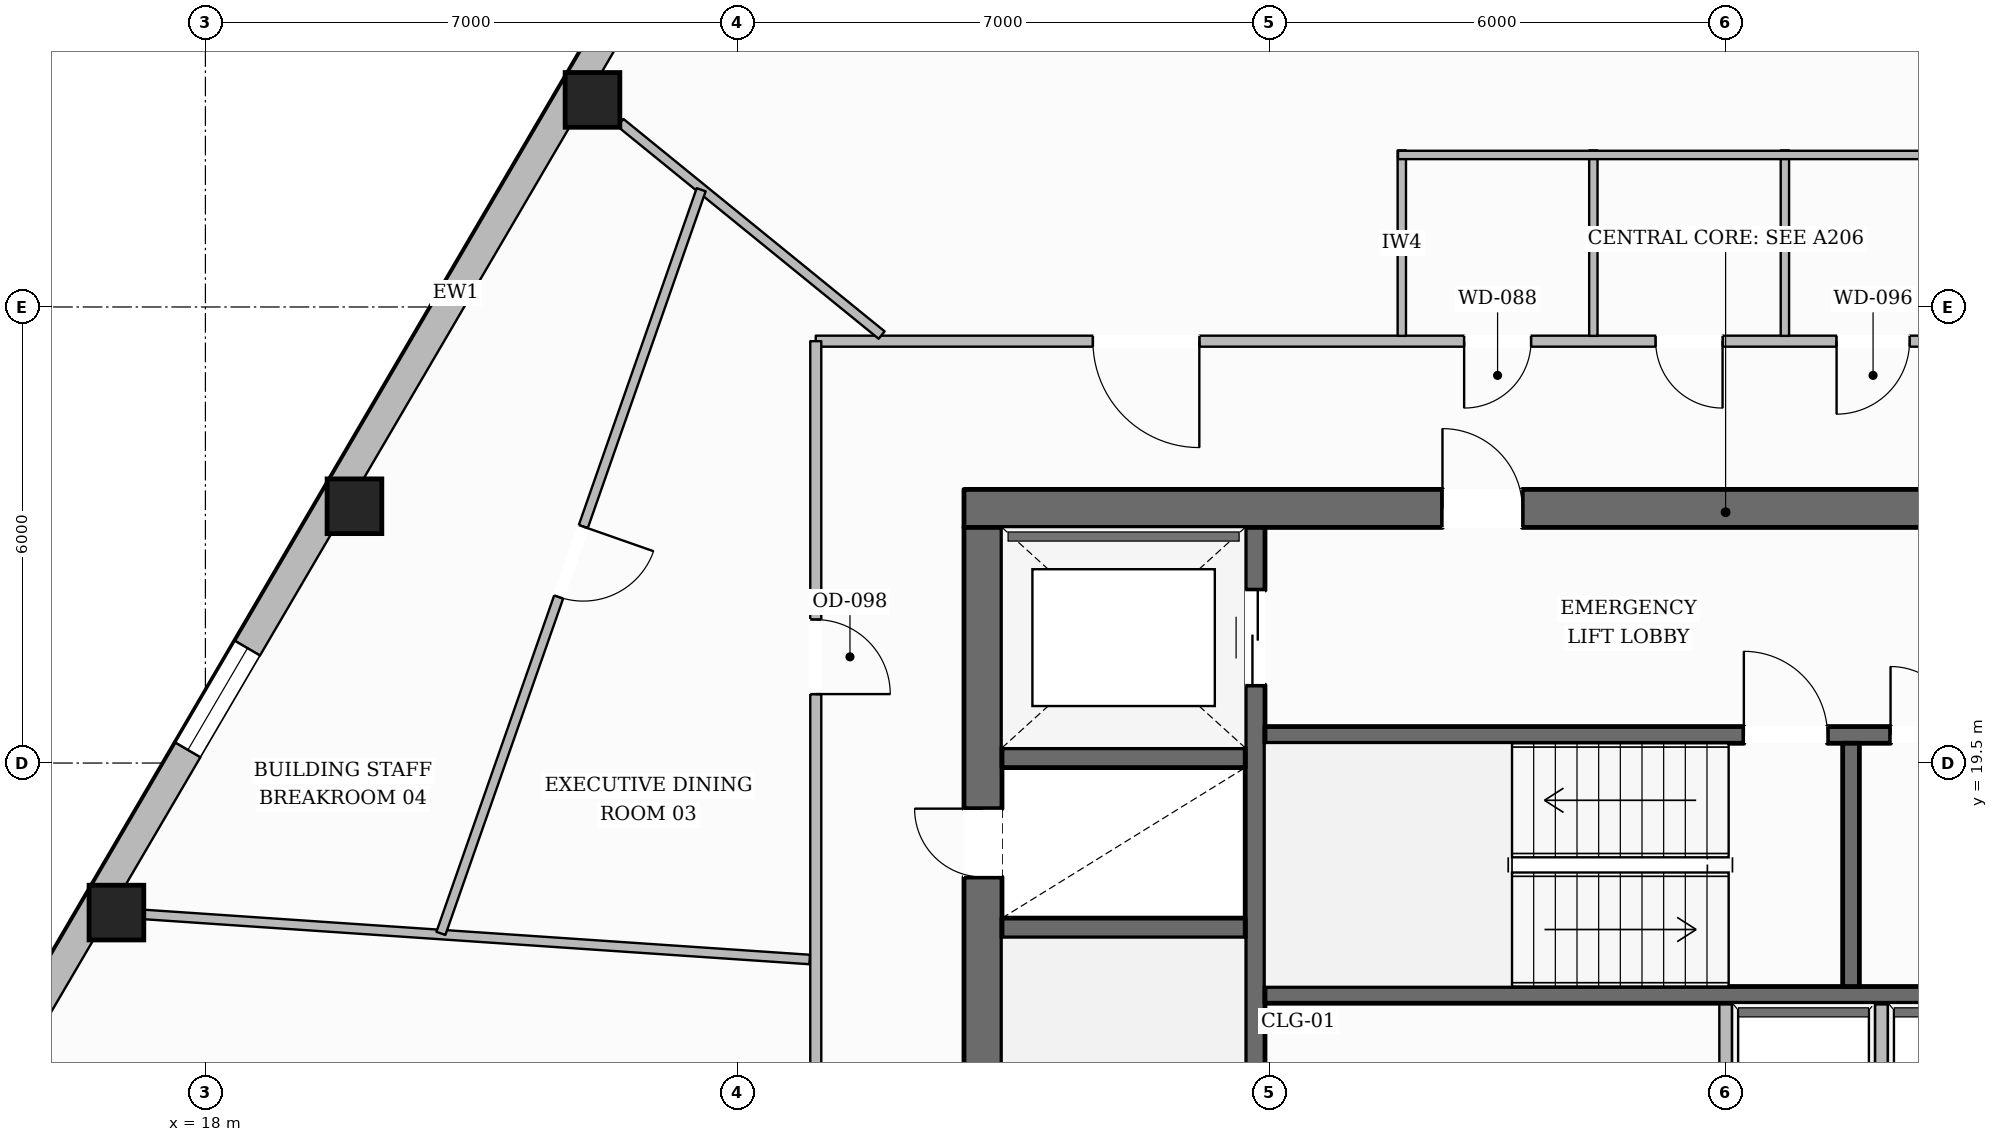
"""IFC4 building model, lengths in metres.
Left out: names, types, materials, properties, quantities, classifications, styles, units other than length and angle.
Written with IfcOpenShell. Run it as: python <this file> out.ifc"""

import sys

from ifc_helpers import new_model, si_unit, direction, frame, frame_2d, origin, origin_2d, place, context, subcontext, project, spatial, rectangle, hollow_rectangle, extrude, element, fill, save


model = new_model("IFC4")
c1 = context("Model", 3, precision=1e-05, world=origin(), true_north=direction((0.0, 1.0)))
c2 = subcontext(c1, "Body", "Model", "MODEL_VIEW")
j1 = project(units=[si_unit("LENGTHUNIT", "METRE"), si_unit("PLANEANGLEUNIT", "RADIAN")], contexts=[c1])
p1 = place(None, origin())
s1 = spatial("IfcSite", under=j1, at=p1, CompositionType="ELEMENT")
p2 = place(p1, origin())
s2 = spatial("IfcBuilding", under=s1, at=p2, CompositionType="ELEMENT")
p3 = place(p2, frame((0.0, 0.0, 143.25)))
s3 = spatial("IfcBuildingStorey", under=s2, at=p3, CompositionType="ELEMENT", Elevation=143.25)
p4 = place(p3, frame((27.98, 22.85, 0.0), z_axis=(0.0, 0.0, 1.0), x_axis=(1.0, 0.0, 0.0)))
e1 = element("IfcWall", 1, at=p4, inside=s3, PredefinedType="SOLIDWALL", context=c2, shape_type="SweptSolid", body=[
    extrude(rectangle(XDim=20.04, YDim=0.5, at=frame_2d((10.02, 0.0))), origin(), (0.0, 0.0, 1.0), 3.6),
])
p5 = place(p4, frame((6.295, 0.0, 0.0)))
e2 = element("IfcOpeningElement", 2, at=p5, cuts=e1, PredefinedType="OPENING", context=c2, shape_type="SweptSolid", body=[
    extrude(rectangle(XDim=1.05, YDim=2.15, at=frame_2d((0.525, 1.075))), frame((0.0, 0.26, 0.0), z_axis=(0.0, -1.0, 0.0), x_axis=(1.0, 0.0, 0.0)), (0.0, 0.0, 1.0), 0.52),
])
p6 = place(p4, frame((12.695, 0.0, 0.0)))
e3 = element("IfcOpeningElement", 3, at=p6, cuts=e1, PredefinedType="OPENING", context=c2, shape_type="SweptSolid", body=[
    extrude(rectangle(XDim=1.05, YDim=2.15, at=frame_2d((0.525, 1.075))), frame((0.0, 0.26, 0.0), z_axis=(0.0, -1.0, 0.0), x_axis=(1.0, 0.0, 0.0)), (0.0, 0.0, 1.0), 0.52),
])
p7 = place(p3, frame((28.23, 9.6, 0.0), z_axis=(0.0, 0.0, 1.0), x_axis=(0.0, 1.0, 0.0)))
e4 = element("IfcWall", 4, at=p7, inside=s3, PredefinedType="SOLIDWALL", context=c2, shape_type="SweptSolid", body=[
    extrude(rectangle(XDim=13.0, YDim=0.5, at=frame_2d((6.5, 0.0))), origin(), (0.0, 0.0, 1.0), 3.6),
])
p8 = place(p7, frame((0.2, 0.0, 0.0)))
e5 = element("IfcOpeningElement", 5, at=p8, cuts=e4, PredefinedType="OPENING", context=c2, shape_type="SweptSolid", body=[
    extrude(rectangle(XDim=1.1, YDim=2.15, at=frame_2d((0.55, 1.075))), frame((0.0, 0.26, 0.0), z_axis=(0.0, -1.0, 0.0), x_axis=(1.0, 0.0, 0.0)), (0.0, 0.0, 1.0), 0.52),
])
p9 = place(p7, frame((8.4, 0.0, 0.0)))
e6 = element("IfcOpeningElement", 6, at=p9, cuts=e4, PredefinedType="OPENING", context=c2, shape_type="SweptSolid", body=[
    extrude(rectangle(XDim=0.9, YDim=2.1, at=frame_2d((0.45, 1.05))), frame((0.0, 0.26, 0.0), z_axis=(0.0, -1.0, 0.0), x_axis=(1.0, 0.0, 0.0)), (0.0, 0.0, 1.0), 0.52),
])
p10 = place(p3, frame((31.81, 9.6, 0.0), z_axis=(0.0, 0.0, 1.0), x_axis=(0.0, 1.0, 0.0)))
e7 = element("IfcWall", 7, at=p10, inside=s3, PredefinedType="SHEAR", context=c2, shape_type="SweptSolid", body=[
    extrude(rectangle(XDim=13.0, YDim=0.26, at=frame_2d((6.5, 0.0))), origin(), (0.0, 0.0, 1.0), 3.6),
])
p11 = place(p10, frame((10.925, 0.0, 0.0)))
e8 = element("IfcOpeningElement", 8, at=p11, cuts=e7, PredefinedType="OPENING", context=c2, shape_type="SweptSolid", body=[
    extrude(rectangle(XDim=1.25, YDim=2.25, at=frame_2d((0.625, 1.125))), frame((0.0, 0.14, 0.0), z_axis=(0.0, -1.0, 0.0), x_axis=(1.0, 0.0, 0.0)), (0.0, 0.0, 1.0), 0.28),
])
for number, where, z_axis, x_axis in (
    (9, (28.48, 17.33, 0.0), (0.0, 0.0, 1.0), (1.0, 0.0, 0.0)),
    (10, (28.48, 19.57, 0.0), (0.0, 0.0, 1.0), (1.0, 0.0, 0.0)),
):
    element("IfcWall", number, at=place(p3, frame(where, z_axis=z_axis, x_axis=x_axis)), inside=s3, PredefinedType="SHEAR", context=c2, shape_type="SweptSolid", body=[
        extrude(rectangle(XDim=3.2, YDim=0.26, at=frame_2d((1.6, 0.0))), origin(), (0.0, 0.0, 1.0), 3.6),
    ])
p12 = place(p3, frame((31.94, 19.87, 0.0), z_axis=(0.0, 0.0, 1.0), x_axis=(1.0, 0.0, 0.0)))
e11 = element("IfcWall", 11, at=p12, inside=s3, PredefinedType="SOLIDWALL", context=c2, shape_type="SweptSolid", body=[
    extrude(rectangle(XDim=12.12, YDim=0.22, at=frame_2d((6.06, 0.0))), origin(), (0.0, 0.0, 1.0), 3.6),
])
p13 = place(p12, frame((6.3, 0.0, 0.0)))
e12 = element("IfcOpeningElement", 12, at=p13, cuts=e11, PredefinedType="OPENING", context=c2, shape_type="SweptSolid", body=[
    extrude(rectangle(XDim=1.1, YDim=2.15, at=frame_2d((0.55, 1.075))), frame((0.0, 0.12, 0.0), z_axis=(0.0, -1.0, 0.0), x_axis=(1.0, 0.0, 0.0)), (0.0, 0.0, 1.0), 0.24),
])
p14 = place(p12, frame((8.23, 0.0, 0.0)))
e13 = element("IfcOpeningElement", 13, at=p14, cuts=e11, PredefinedType="OPENING", context=c2, shape_type="SweptSolid", body=[
    extrude(rectangle(XDim=0.9, YDim=2.1, at=frame_2d((0.45, 1.05))), frame((0.0, 0.12, 0.0), z_axis=(0.0, -1.0, 0.0), x_axis=(1.0, 0.0, 0.0)), (0.0, 0.0, 1.0), 0.24),
])
p15 = place(p12, frame((10.45, 0.0, 0.0)))
e14 = element("IfcOpeningElement", 14, at=p15, cuts=e11, PredefinedType="OPENING", context=c2, shape_type="SweptSolid", body=[
    extrude(rectangle(XDim=0.9, YDim=2.1, at=frame_2d((0.45, 1.05))), frame((0.0, 0.12, 0.0), z_axis=(0.0, -1.0, 0.0), x_axis=(1.0, 0.0, 0.0)), (0.0, 0.0, 1.0), 0.24),
])
p16 = place(p3, frame((31.94, 16.45, 0.0), z_axis=(0.0, 0.0, 1.0), x_axis=(1.0, 0.0, 0.0)))
e15 = element("IfcWall", 15, at=p16, inside=s3, PredefinedType="SOLIDWALL", context=c2, shape_type="SweptSolid", body=[
    extrude(rectangle(XDim=12.12, YDim=0.22, at=frame_2d((6.06, 0.0))), origin(), (0.0, 0.0, 1.0), 3.6),
])
p17 = place(p3, frame((39.65, 16.56, 0.0), z_axis=(0.0, 0.0, 1.0), x_axis=(0.0, 1.0, 0.0)))
e16 = element("IfcWall", 16, at=p17, inside=s3, PredefinedType="SOLIDWALL", context=c2, shape_type="SweptSolid", body=[
    extrude(rectangle(XDim=3.2, YDim=0.22, at=frame_2d((1.6, 0.0))), origin(), (0.0, 0.0, 1.0), 3.6),
])
for number, where, z_axis, x_axis in (
    (17, (23.093, 28.224, 0.0), (0.0, 0.0, 1.0), (1.0, 0.0, 0.0)),
    (18, (19.961, 22.878, 0.0), (0.0, 0.0, 1.0), (1.0, 0.0, 0.0)),
    (19, (16.829, 17.533, 0.0), (0.0, 0.0, 1.0), (1.0, 0.0, 0.0)),
):
    element("IfcColumn", number, at=place(p3, frame(where, z_axis=z_axis, x_axis=x_axis)), inside=s3, PredefinedType="COLUMN", context=c2, shape_type="SweptSolid", body=[
        extrude(hollow_rectangle(XDim=0.72, YDim=0.72, WallThickness=0.032, at=origin_2d()), origin(), (0.0, 0.0, 1.0), 3.6),
    ])
p18 = place(p3, frame((13.223, 11.91, 0.0), z_axis=(0.0, 0.0, 1.0), x_axis=(0.505453242286, 0.86285399684, 0.0)))
e20 = element("IfcWall", 20, at=p18, inside=s3, PredefinedType="STANDARD", context=c2, shape_type="SweptSolid", body=[
    extrude(rectangle(XDim=38.125, YDim=0.38, at=frame_2d((19.062, 0.0))), origin(), (0.0, 0.0, 1.0), 3.059),
])
p19 = place(p18, frame((27.994, 0.0, 0.0)))
e21 = element("IfcOpeningElement", 21, at=p19, cuts=e20, PredefinedType="OPENING", context=c2, shape_type="SweptSolid", body=[
    extrude(rectangle(XDim=1.0, YDim=2.2, at=frame_2d((0.5, 1.1))), frame((0.0, 0.2, 0.0), z_axis=(0.0, -1.0, 0.0), x_axis=(1.0, 0.0, 0.0)), (0.0, 0.0, 1.0), 0.4),
])
p20 = place(p18, frame((33.78, 0.0, 0.65)))
e22 = element("IfcOpeningElement", 22, at=p20, cuts=e20, PredefinedType="OPENING", context=c2, shape_type="SweptSolid", body=[
    extrude(rectangle(XDim=1.55, YDim=1.75, at=frame_2d((0.775, 0.875))), frame((0.0, 0.2, 0.0), z_axis=(0.0, -1.0, 0.0), x_axis=(1.0, 0.0, 0.0)), (0.0, 0.0, 1.0), 0.4),
])
p21 = place(p18, frame((21.388, 0.0, 0.65)))
e23 = element("IfcOpeningElement", 23, at=p21, cuts=e20, PredefinedType="OPENING", context=c2, shape_type="SweptSolid", body=[
    extrude(rectangle(XDim=1.55, YDim=1.75, at=frame_2d((0.775, 0.875))), frame((0.0, 0.2, 0.0), z_axis=(0.0, -1.0, 0.0), x_axis=(1.0, 0.0, 0.0)), (0.0, 0.0, 1.0), 0.4),
])
p22 = place(p18, frame((8.997, 0.0, 0.65)))
e24 = element("IfcOpeningElement", 24, at=p22, cuts=e20, PredefinedType="OPENING", context=c2, shape_type="SweptSolid", body=[
    extrude(rectangle(XDim=1.55, YDim=1.75, at=frame_2d((0.775, 0.875))), frame((0.0, 0.2, 0.0), z_axis=(0.0, -1.0, 0.0), x_axis=(1.0, 0.0, 0.0)), (0.0, 0.0, 1.0), 0.4),
])
p23 = place(p18, frame((2.802, 0.0, 0.65)))
e25 = element("IfcOpeningElement", 25, at=p23, cuts=e20, PredefinedType="OPENING", context=c2, shape_type="SweptSolid", body=[
    extrude(rectangle(XDim=1.55, YDim=1.75, at=frame_2d((0.775, 0.875))), frame((0.0, 0.2, 0.0), z_axis=(0.0, -1.0, 0.0), x_axis=(1.0, 0.0, 0.0)), (0.0, 0.0, 1.0), 0.4),
])
for number, where, z_axis, x_axis in (
    (26, (38.0, 14.1, 0.0), (0.0, 0.0, 1.0), (0.0, 1.0, 0.0)),
    (27, (40.05, 14.1, 0.0), (0.0, 0.0, 1.0), (0.0, 1.0, 0.0)),
):
    element("IfcWall", number, at=place(p3, frame(where, z_axis=z_axis, x_axis=x_axis)), inside=s3, PredefinedType="PARTITIONING", context=c2, shape_type="SweptSolid", body=[
        extrude(rectangle(XDim=2.24, YDim=0.165, at=frame_2d((1.12, 0.0))), origin(), (0.0, 0.0, 1.0), 3.6),
    ])
p24 = place(p3, frame((49.97, 25.05, 0.0), z_axis=(0.0, 0.0, 1.0), x_axis=(-1.0, 0.0, 0.0)))
e28 = element("IfcWall", 28, at=p24, inside=s3, PredefinedType="PARTITIONING", context=c2, shape_type="SweptSolid", body=[
    extrude(rectangle(XDim=23.94, YDim=0.145, at=frame_2d((11.97, 0.0))), origin(), (0.0, 0.0, 1.0), 3.6),
])
p25 = place(p24, frame((14.53, 0.0, 0.0)))
e29 = element("IfcOpeningElement", 29, at=p25, cuts=e28, PredefinedType="OPENING", context=c2, shape_type="SweptSolid", body=[
    extrude(rectangle(XDim=0.88, YDim=2.1, at=frame_2d((0.44, 1.05))), frame((0.0, 0.083, 0.0), z_axis=(0.0, -1.0, 0.0), x_axis=(1.0, 0.0, 0.0)), (0.0, 0.0, 1.0), 0.165),
])
p26 = place(p24, frame((12.01, 0.0, 0.0)))
e30 = element("IfcOpeningElement", 30, at=p26, cuts=e28, PredefinedType="OPENING", context=c2, shape_type="SweptSolid", body=[
    extrude(rectangle(XDim=0.88, YDim=2.1, at=frame_2d((0.44, 1.05))), frame((0.0, 0.083, 0.0), z_axis=(0.0, -1.0, 0.0), x_axis=(1.0, 0.0, 0.0)), (0.0, 0.0, 1.0), 0.165),
])
p27 = place(p24, frame((9.55, 0.0, 0.0)))
e31 = element("IfcOpeningElement", 31, at=p27, cuts=e28, PredefinedType="OPENING", context=c2, shape_type="SweptSolid", body=[
    extrude(rectangle(XDim=0.96, YDim=2.1, at=frame_2d((0.48, 1.05))), frame((0.0, 0.083, 0.0), z_axis=(0.0, -1.0, 0.0), x_axis=(1.0, 0.0, 0.0)), (0.0, 0.0, 1.0), 0.165),
])
p28 = place(p24, frame((18.894, 0.0, 0.0)))
e32 = element("IfcOpeningElement", 32, at=p28, cuts=e28, PredefinedType="OPENING", context=c2, shape_type="SweptSolid", body=[
    extrude(rectangle(XDim=1.4, YDim=2.2, at=frame_2d((0.7, 1.1))), frame((0.0, 0.083, 0.0), z_axis=(0.0, -1.0, 0.0), x_axis=(1.0, 0.0, 0.0)), (0.0, 0.0, 1.0), 0.165),
])
p29 = place(p3, frame((26.03, 25.05, 0.0), z_axis=(0.0, 0.0, 1.0), x_axis=(0.0, -1.0, 0.0)))
e33 = element("IfcWall", 33, at=p29, inside=s3, PredefinedType="PARTITIONING", context=c2, shape_type="SweptSolid", body=[
    extrude(rectangle(XDim=17.9, YDim=0.145, at=frame_2d((8.95, 0.0))), origin(), (0.0, 0.0, 1.0), 3.288),
])
p30 = place(p29, frame((3.663, 0.0, 0.0)))
e34 = element("IfcOpeningElement", 34, at=p30, cuts=e33, PredefinedType="OPENING", context=c2, shape_type="SweptSolid", body=[
    extrude(rectangle(XDim=0.98, YDim=2.15, at=frame_2d((0.49, 1.075))), frame((0.0, 0.083, 0.0), z_axis=(0.0, -1.0, 0.0), x_axis=(1.0, 0.0, 0.0)), (0.0, 0.0, 1.0), 0.165),
])
p31 = place(p29, frame((12.232, 0.0, 0.0)))
e35 = element("IfcOpeningElement", 35, at=p31, cuts=e33, PredefinedType="OPENING", context=c2, shape_type="SweptSolid", body=[
    extrude(rectangle(XDim=1.4, YDim=2.2, at=frame_2d((0.7, 1.1))), frame((0.0, 0.083, 0.0), z_axis=(0.0, -1.0, 0.0), x_axis=(1.0, 0.0, 0.0)), (0.0, 0.0, 1.0), 0.165),
])
for number, where, z_axis, x_axis in (
    (36, (33.74, 25.12, 0.0), (0.0, 0.0, 1.0), (0.0, 1.0, 0.0)),
    (37, (36.26, 25.12, 0.0), (0.0, 0.0, 1.0), (0.0, 1.0, 0.0)),
    (38, (38.78, 25.12, 0.0), (0.0, 0.0, 1.0), (0.0, 1.0, 0.0)),
):
    element("IfcWall", number, at=place(p3, frame(where, z_axis=z_axis, x_axis=x_axis)), inside=s3, PredefinedType="PLUMBINGWALL", context=c2, shape_type="SweptSolid", body=[
        extrude(rectangle(XDim=2.44, YDim=0.11, at=frame_2d((1.22, 0.0))), origin(), (0.0, 0.0, 1.0), 3.6),
    ])
p32 = place(p3, frame((33.69, 27.5, 0.0), z_axis=(0.0, 0.0, 1.0), x_axis=(1.0, 0.0, 0.0)))
e39 = element("IfcWall", 39, at=p32, inside=s3, PredefinedType="PLUMBINGWALL", context=c2, shape_type="SweptSolid", body=[
    extrude(rectangle(XDim=7.46, YDim=0.11, at=frame_2d((3.73, 0.0))), origin(), (0.0, 0.0, 1.0), 3.6),
])
p33 = place(p3, frame((26.896, 25.131, 0.0), z_axis=(0.0, 0.0, 1.0), x_axis=(-0.775820524707, 0.630953653958, 0.0)))
e40 = element("IfcWall", 40, at=p33, inside=s3, PredefinedType="PARTITIONING", context=c2, shape_type="SweptSolid", body=[
    extrude(rectangle(XDim=4.429, YDim=0.125, at=frame_2d((2.214, 0.0))), origin(), (0.0, 0.0, 1.0), 3.141),
])
p34 = place(p3, frame((25.949, 16.916, 0.0), z_axis=(0.0, 0.0, 1.0), x_axis=(-0.997717908237, 0.067520186492, 0.0)))
e41 = element("IfcWall", 41, at=p34, inside=s3, PredefinedType="PARTITIONING", context=c2, shape_type="SweptSolid", body=[
    extrude(rectangle(XDim=8.772, YDim=0.125, at=frame_2d((4.386, 0.0))), origin(), (0.0, 0.0, 1.0), 3.141),
])
p35 = place(p3, frame((24.522, 27.042, 0.0), z_axis=(0.0, 0.0, 1.0), x_axis=(-0.330346228004, -0.943859825209, 0.0)))
e42 = element("IfcWall", 42, at=p35, inside=s3, PredefinedType="PARTITIONING", context=c2, shape_type="SweptSolid", body=[
    extrude(rectangle(XDim=10.365, YDim=0.125, at=frame_2d((5.183, 0.0))), origin(), (0.0, 0.0, 1.0), 3.288),
])
p36 = place(p35, frame((4.695, 0.0, 0.0)))
e43 = element("IfcOpeningElement", 43, at=p36, cuts=e42, PredefinedType="OPENING", context=c2, shape_type="SweptSolid", body=[
    extrude(rectangle(XDim=0.98, YDim=2.15, at=frame_2d((0.49, 1.075))), frame((0.0, 0.073, 0.0), z_axis=(0.0, -1.0, 0.0), x_axis=(1.0, 0.0, 0.0)), (0.0, 0.0, 1.0), 0.145),
])
p37 = place(p22, origin())
e44 = element("IfcWindow", 44, at=p37, inside=s3, PartitioningType="SINGLE_PANEL", PredefinedType="WINDOW", context=c2, shape_type="SweptSolid", body=[
    extrude(rectangle(XDim=1.55, YDim=1.75, at=frame_2d((0.775, 0.875))), frame((0.0, 0.03, 0.0), z_axis=(0.0, -1.0, 0.0), x_axis=(1.0, 0.0, 0.0)), (0.0, 0.0, 1.0), 0.06),
])
fill(e24, e44)
p38 = place(p13, origin())
e45 = element("IfcDoor", 45, at=p38, inside=s3, OperationType="SINGLE_SWING_LEFT", PredefinedType="DOOR", context=c2, shape_type="SweptSolid", body=[
    extrude(rectangle(XDim=1.1, YDim=2.15, at=frame_2d((0.55, 1.075))), frame((0.0, 0.025, 0.0), z_axis=(0.0, -1.0, 0.0), x_axis=(1.0, 0.0, 0.0)), (0.0, 0.0, 1.0), 0.05),
])
fill(e12, e45)
p39 = place(p9, origin())
e46 = element("IfcDoor", 46, at=p39, inside=s3, OperationType="SINGLE_SWING_RIGHT", PredefinedType="DOOR", context=c2, shape_type="SweptSolid", body=[
    extrude(rectangle(XDim=0.9, YDim=2.1, at=frame_2d((0.45, 1.05))), frame((0.0, 0.025, 0.0), z_axis=(0.0, -1.0, 0.0), x_axis=(1.0, 0.0, 0.0)), (0.0, 0.0, 1.0), 0.05),
])
fill(e6, e46)
p40 = place(p5, origin())
e47 = element("IfcDoor", 47, at=p40, inside=s3, OperationType="SINGLE_SWING_LEFT", PredefinedType="DOOR", context=c2, shape_type="SweptSolid", body=[
    extrude(rectangle(XDim=1.05, YDim=2.15, at=frame_2d((0.525, 1.075))), frame((0.0, 0.025, 0.0), z_axis=(0.0, -1.0, 0.0), x_axis=(1.0, 0.0, 0.0)), (0.0, 0.0, 1.0), 0.05),
])
fill(e2, e47)
p41 = place(p11, origin())
e48 = element("IfcDoor", 48, at=p41, inside=s3, OperationType="DOUBLE_DOOR_SLIDING", PredefinedType="DOOR", context=c2, shape_type="SweptSolid", body=[
    extrude(rectangle(XDim=1.25, YDim=2.25, at=frame_2d((0.625, 1.125))), frame((0.0, 0.025, 0.0), z_axis=(0.0, -1.0, 0.0), x_axis=(1.0, 0.0, 0.0)), (0.0, 0.0, 1.0), 0.05),
])
fill(e8, e48)
p42 = place(p14, origin())
e49 = element("IfcDoor", 49, at=p42, inside=s3, OperationType="SINGLE_SWING_LEFT", PredefinedType="DOOR", context=c2, shape_type="SweptSolid", body=[
    extrude(rectangle(XDim=0.9, YDim=2.1, at=frame_2d((0.45, 1.05))), frame((0.0, 0.025, 0.0), z_axis=(0.0, -1.0, 0.0), x_axis=(1.0, 0.0, 0.0)), (0.0, 0.0, 1.0), 0.05),
])
fill(e13, e49)
p43 = place(p25, origin())
e50 = element("IfcDoor", 50, at=p43, inside=s3, OperationType="SINGLE_SWING_RIGHT", PredefinedType="DOOR", context=c2, shape_type="SweptSolid", body=[
    extrude(rectangle(XDim=0.88, YDim=2.1, at=frame_2d((0.44, 1.05))), frame((0.0, 0.025, 0.0), z_axis=(0.0, -1.0, 0.0), x_axis=(1.0, 0.0, 0.0)), (0.0, 0.0, 1.0), 0.05),
])
fill(e29, e50)
p44 = place(p26, origin())
e51 = element("IfcDoor", 51, at=p44, inside=s3, OperationType="SINGLE_SWING_LEFT", PredefinedType="DOOR", context=c2, shape_type="SweptSolid", body=[
    extrude(rectangle(XDim=0.88, YDim=2.1, at=frame_2d((0.44, 1.05))), frame((0.0, 0.025, 0.0), z_axis=(0.0, -1.0, 0.0), x_axis=(1.0, 0.0, 0.0)), (0.0, 0.0, 1.0), 0.05),
])
fill(e30, e51)
p45 = place(p27, origin())
e52 = element("IfcDoor", 52, at=p45, inside=s3, OperationType="SINGLE_SWING_RIGHT", PredefinedType="DOOR", context=c2, shape_type="SweptSolid", body=[
    extrude(rectangle(XDim=0.96, YDim=2.1, at=frame_2d((0.48, 1.05))), frame((0.0, 0.025, 0.0), z_axis=(0.0, -1.0, 0.0), x_axis=(1.0, 0.0, 0.0)), (0.0, 0.0, 1.0), 0.05),
])
fill(e31, e52)
p46 = place(p28, origin())
e53 = element("IfcDoor", 53, at=p46, inside=s3, OperationType="SINGLE_SWING_LEFT", PredefinedType="DOOR", context=c2, shape_type="SweptSolid", body=[
    extrude(rectangle(XDim=1.4, YDim=2.2, at=frame_2d((0.7, 1.1))), frame((0.0, 0.025, 0.0), z_axis=(0.0, -1.0, 0.0), x_axis=(1.0, 0.0, 0.0)), (0.0, 0.0, 1.0), 0.05),
])
fill(e32, e53)
p47 = place(p30, origin())
e54 = element("IfcDoor", 54, at=p47, inside=s3, OperationType="SINGLE_SWING_RIGHT", PredefinedType="DOOR", context=c2, shape_type="SweptSolid", body=[
    extrude(rectangle(XDim=0.98, YDim=2.15, at=frame_2d((0.49, 1.075))), frame((0.0, 0.025, 0.0), z_axis=(0.0, -1.0, 0.0), x_axis=(1.0, 0.0, 0.0)), (0.0, 0.0, 1.0), 0.05),
])
fill(e34, e54)
p48 = place(p36, origin())
e55 = element("IfcDoor", 55, at=p48, inside=s3, OperationType="SINGLE_SWING_LEFT", PredefinedType="DOOR", context=c2, shape_type="SweptSolid", body=[
    extrude(rectangle(XDim=0.98, YDim=2.15, at=frame_2d((0.49, 1.075))), frame((0.0, 0.025, 0.0), z_axis=(0.0, -1.0, 0.0), x_axis=(1.0, 0.0, 0.0)), (0.0, 0.0, 1.0), 0.05),
])
fill(e43, e55)
save(model, sys.argv[1])
